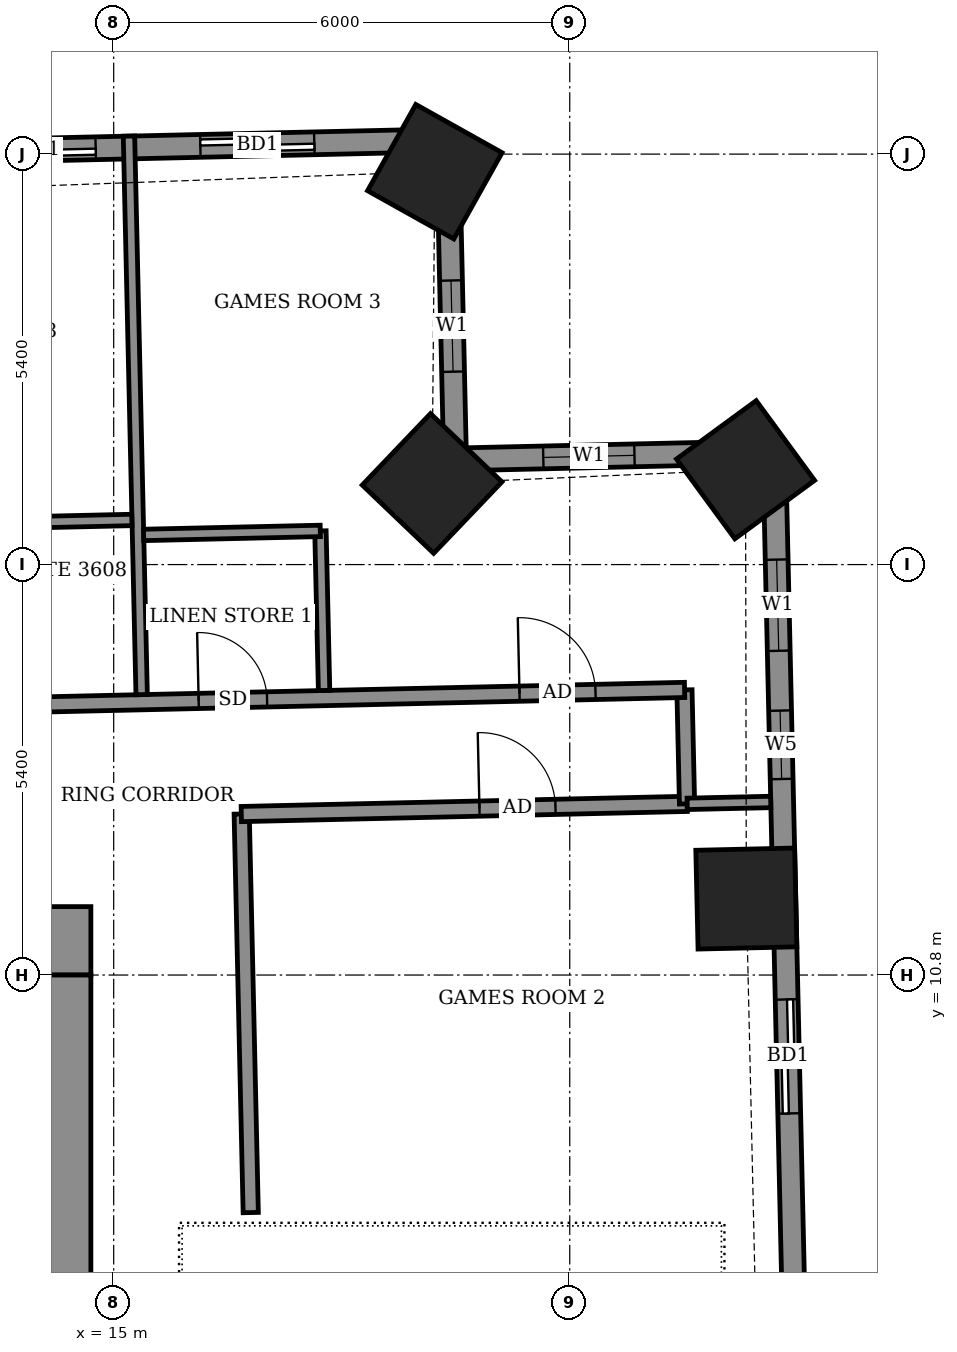
"""IFC4 building model, lengths in metres.
Left out: names, types, materials, properties, quantities, classifications, styles, units other than length and angle.
Written with IfcOpenShell. Run it as: python <this file> out.ifc"""

import sys

from ifc_helpers import new_model, si_unit, direction, frame, frame_2d, origin, origin_2d, place, context, subcontext, project, spatial, rectangle, extrude, element, fill, save


model = new_model("IFC4")
c1 = context("Model", 3, precision=1e-05, world=origin(), true_north=direction((0.0, 1.0)))
c2 = subcontext(c1, "Body", "Model", "MODEL_VIEW")
j1 = project(units=[si_unit("LENGTHUNIT", "METRE"), si_unit("PLANEANGLEUNIT", "RADIAN")], contexts=[c1])
p1 = place(None, origin())
s1 = spatial("IfcSite", under=j1, at=p1, CompositionType="ELEMENT")
p2 = place(p1, origin())
s2 = spatial("IfcBuilding", under=s1, at=p2, CompositionType="ELEMENT")
p3 = place(p2, frame((0.0, 0.0, 144.5)))
s3 = spatial("IfcBuildingStorey", under=s2, at=p3, CompositionType="ELEMENT", Elevation=144.5)
for number, where, z_axis, x_axis in (
    (1, (23.323, 11.806, -0.55), (0.0, 0.0, 1.0), (-0.023, 1.0, 0.0)),
    (2, (23.313, 17.448, -0.55), (0.0, 0.0, 1.0), (-0.591, 0.807, 0.0)),
    (3, (19.189, 17.267, -0.55), (0.0, 0.0, 1.0), (-0.723, 0.691, 0.0)),
    (4, (19.225, 21.369, -0.55), (0.0, 0.0, 1.0), (-0.873, 0.488, 0.0)),
):
    element("IfcColumn", number, at=place(p3, frame(where, z_axis=z_axis, x_axis=x_axis)), inside=s3, PredefinedType="COLUMN", context=c2, shape_type="SweptSolid", body=[
        extrude(rectangle(XDim=1.3, YDim=1.3, at=origin_2d()), origin(), (0.0, 0.0, 1.0), 3.6),
    ])
p4 = place(p3, frame((23.961, 5.752, 0.0), z_axis=(0.0, 0.0, 1.0), x_axis=(-0.022715362207, 0.999741972871, 0.0)))
e5 = element("IfcWall", 5, at=p4, inside=s3, PredefinedType="SOLIDWALL", context=c2, shape_type="SweptSolid", body=[
    extrude(rectangle(XDim=11.93, YDim=0.3, at=frame_2d((5.965, 0.0))), origin(), (0.0, 0.0, 1.0), 3.05),
])
p5 = place(p4, frame((3.228, 0.0, 0.0)))
e6 = element("IfcOpeningElement", 6, at=p5, cuts=e5, PredefinedType="OPENING", context=c2, shape_type="SweptSolid", body=[
    extrude(rectangle(XDim=1.5, YDim=2.4, at=frame_2d((0.75, 1.2))), frame((0.0, 0.16, 0.0), z_axis=(0.0, -1.0, 0.0), x_axis=(1.0, 0.0, 0.0)), (0.0, 0.0, 1.0), 0.32),
])
p6 = place(p4, frame((7.629, 0.0, 0.9)))
e7 = element("IfcOpeningElement", 7, at=p6, cuts=e5, PredefinedType="OPENING", context=c2, shape_type="SweptSolid", body=[
    extrude(rectangle(XDim=0.9, YDim=1.5, at=frame_2d((0.45, 0.75))), frame((0.0, 0.16, 0.0), z_axis=(0.0, -1.0, 0.0), x_axis=(1.0, 0.0, 0.0)), (0.0, 0.0, 1.0), 0.32),
])
p7 = place(p4, frame((9.316, 0.0, 0.9)))
e8 = element("IfcOpeningElement", 8, at=p7, cuts=e5, PredefinedType="OPENING", context=c2, shape_type="SweptSolid", body=[
    extrude(rectangle(XDim=1.2, YDim=1.5, at=frame_2d((0.6, 0.75))), frame((0.0, 0.16, 0.0), z_axis=(0.0, -1.0, 0.0), x_axis=(1.0, 0.0, 0.0)), (0.0, 0.0, 1.0), 0.32),
])
p8 = place(p3, frame((23.69, 17.679, 0.0), z_axis=(0.0, 0.0, 1.0), x_axis=(-0.999739037152, -0.022844202663, 0.0)))
e9 = element("IfcWall", 9, at=p8, inside=s3, PredefinedType="SOLIDWALL", context=c2, shape_type="SweptSolid", body=[
    extrude(rectangle(XDim=4.2, YDim=0.3, at=frame_2d((2.1, 0.0))), origin(), (0.0, 0.0, 1.0), 2.55),
])
p9 = place(p8, frame((1.839, 0.0, 0.9)))
e10 = element("IfcOpeningElement", 10, at=p9, cuts=e9, PredefinedType="OPENING", context=c2, shape_type="SweptSolid", body=[
    extrude(rectangle(XDim=1.2, YDim=1.5, at=frame_2d((0.6, 0.75))), frame((0.0, 0.16, 0.0), z_axis=(0.0, -1.0, 0.0), x_axis=(1.0, 0.0, 0.0)), (0.0, 0.0, 1.0), 0.32),
])
p10 = place(p3, frame((19.491, 17.583, 0.0), z_axis=(0.0, 0.0, 1.0), x_axis=(-0.022611811187, 0.999744320311, 0.0)))
e11 = element("IfcWall", 11, at=p10, inside=s3, PredefinedType="SOLIDWALL", context=c2, shape_type="SweptSolid", body=[
    extrude(rectangle(XDim=4.2, YDim=0.3, at=frame_2d((2.1, 0.0))), origin(), (0.0, 0.0, 1.0), 2.55),
])
p11 = place(p10, frame((1.155, 0.0, 0.9)))
e12 = element("IfcOpeningElement", 12, at=p11, cuts=e11, PredefinedType="OPENING", context=c2, shape_type="SweptSolid", body=[
    extrude(rectangle(XDim=1.2, YDim=1.5, at=frame_2d((0.6, 0.75))), frame((0.0, 0.16, 0.0), z_axis=(0.0, -1.0, 0.0), x_axis=(1.0, 0.0, 0.0)), (0.0, 0.0, 1.0), 0.32),
])
p12 = place(p3, frame((19.396, 21.782, 0.0), z_axis=(0.0, 0.0, 1.0), x_axis=(-0.999742636707, -0.022686126826, 0.0)))
e13 = element("IfcWall", 13, at=p12, inside=s3, PredefinedType="SOLIDWALL", context=c2, shape_type="SweptSolid", body=[
    extrude(rectangle(XDim=42.444, YDim=0.3, at=frame_2d((21.222, 0.0))), origin(), (0.0, 0.0, 1.0), 3.05),
])
p13 = place(p12, frame((1.757, 0.0, 0.0)))
e14 = element("IfcOpeningElement", 14, at=p13, cuts=e13, PredefinedType="OPENING", context=c2, shape_type="SweptSolid", body=[
    extrude(rectangle(XDim=1.5, YDim=2.4, at=frame_2d((0.75, 1.2))), frame((0.0, 0.16, 0.0), z_axis=(0.0, -1.0, 0.0), x_axis=(1.0, 0.0, 0.0)), (0.0, 0.0, 1.0), 0.32),
])
p14 = place(p12, frame((4.634, 0.0, 0.0)))
e15 = element("IfcOpeningElement", 15, at=p14, cuts=e13, PredefinedType="OPENING", context=c2, shape_type="SweptSolid", body=[
    extrude(rectangle(XDim=1.5, YDim=2.4, at=frame_2d((0.75, 1.2))), frame((0.0, 0.16, 0.0), z_axis=(0.0, -1.0, 0.0), x_axis=(1.0, 0.0, 0.0)), (0.0, 0.0, 1.0), 0.32),
])
p15 = place(p12, frame((9.769, 0.0, 0.0)))
e16 = element("IfcOpeningElement", 16, at=p15, cuts=e13, PredefinedType="OPENING", context=c2, shape_type="SweptSolid", body=[
    extrude(rectangle(XDim=1.5, YDim=2.4, at=frame_2d((0.75, 1.2))), frame((0.0, 0.16, 0.0), z_axis=(0.0, -1.0, 0.0), x_axis=(1.0, 0.0, 0.0)), (0.0, 0.0, 1.0), 0.32),
])
p16 = place(p12, frame((14.946, 0.0, 0.0)))
e17 = element("IfcOpeningElement", 17, at=p16, cuts=e13, PredefinedType="OPENING", context=c2, shape_type="SweptSolid", body=[
    extrude(rectangle(XDim=1.5, YDim=2.4, at=frame_2d((0.75, 1.2))), frame((0.0, 0.16, 0.0), z_axis=(0.0, -1.0, 0.0), x_axis=(1.0, 0.0, 0.0)), (0.0, 0.0, 1.0), 0.32),
])
p17 = place(p12, frame((18.108, 0.0, 0.0)))
e18 = element("IfcOpeningElement", 18, at=p17, cuts=e13, PredefinedType="OPENING", context=c2, shape_type="SweptSolid", body=[
    extrude(rectangle(XDim=1.5, YDim=2.4, at=frame_2d((0.75, 1.2))), frame((0.0, 0.16, 0.0), z_axis=(0.0, -1.0, 0.0), x_axis=(1.0, 0.0, 0.0)), (0.0, 0.0, 1.0), 0.32),
])
p18 = place(p12, frame((22.733, 0.0, 0.0)))
e19 = element("IfcOpeningElement", 19, at=p18, cuts=e13, PredefinedType="OPENING", context=c2, shape_type="SweptSolid", body=[
    extrude(rectangle(XDim=1.5, YDim=2.4, at=frame_2d((0.75, 1.2))), frame((0.0, 0.16, 0.0), z_axis=(0.0, -1.0, 0.0), x_axis=(1.0, 0.0, 0.0)), (0.0, 0.0, 1.0), 0.32),
])
p19 = place(p12, frame((25.895, 0.0, 0.0)))
e20 = element("IfcOpeningElement", 20, at=p19, cuts=e13, PredefinedType="OPENING", context=c2, shape_type="SweptSolid", body=[
    extrude(rectangle(XDim=1.5, YDim=2.4, at=frame_2d((0.75, 1.2))), frame((0.0, 0.16, 0.0), z_axis=(0.0, -1.0, 0.0), x_axis=(1.0, 0.0, 0.0)), (0.0, 0.0, 1.0), 0.32),
])
p20 = place(p12, frame((30.944, 0.0, 0.0)))
e21 = element("IfcOpeningElement", 21, at=p20, cuts=e13, PredefinedType="OPENING", context=c2, shape_type="SweptSolid", body=[
    extrude(rectangle(XDim=1.5, YDim=2.4, at=frame_2d((0.75, 1.2))), frame((0.0, 0.16, 0.0), z_axis=(0.0, -1.0, 0.0), x_axis=(1.0, 0.0, 0.0)), (0.0, 0.0, 1.0), 0.32),
])
p21 = place(p12, frame((36.232, 0.0, 0.0)))
e22 = element("IfcOpeningElement", 22, at=p21, cuts=e13, PredefinedType="OPENING", context=c2, shape_type="SweptSolid", body=[
    extrude(rectangle(XDim=1.5, YDim=2.4, at=frame_2d((0.75, 1.2))), frame((0.0, 0.16, 0.0), z_axis=(0.0, -1.0, 0.0), x_axis=(1.0, 0.0, 0.0)), (0.0, 0.0, 1.0), 0.32),
])
p22 = place(p12, frame((38.612, 0.0, 0.9)))
e23 = element("IfcOpeningElement", 23, at=p22, cuts=e13, PredefinedType="OPENING", context=c2, shape_type="SweptSolid", body=[
    extrude(rectangle(XDim=2.4, YDim=1.5, at=frame_2d((1.2, 0.75))), frame((0.0, 0.16, 0.0), z_axis=(0.0, -1.0, 0.0), x_axis=(1.0, 0.0, 0.0)), (0.0, 0.0, 1.0), 0.32),
])
p23 = place(p3, frame((16.803, 7.675, 0.0), z_axis=(0.0, 0.0, 1.0), x_axis=(-0.022667483124, 0.999743059595, 0.0)))
e24 = element("IfcWall", 24, at=p23, inside=s3, PredefinedType="PARTITIONING", context=c2, shape_type="SweptSolid", body=[
    extrude(rectangle(XDim=5.245, YDim=0.2, at=frame_2d((2.623, 0.0))), origin(), (0.0, 0.0, 1.0), 3.05),
])
p24 = place(p3, frame((16.679, 12.918, 0.0), z_axis=(0.0, 0.0, 1.0), x_axis=(0.999739057042, 0.022843332181, 0.0)))
e25 = element("IfcWall", 25, at=p24, inside=s3, PredefinedType="PARTITIONING", context=c2, shape_type="SweptSolid", body=[
    extrude(rectangle(XDim=5.867, YDim=0.2, at=frame_2d((2.934, 0.0))), origin(), (0.0, 0.0, 1.0), 3.05),
])
p25 = place(p24, frame((3.134, 0.0, 0.0)))
e26 = element("IfcOpeningElement", 26, at=p25, cuts=e25, PredefinedType="OPENING", context=c2, shape_type="SweptSolid", body=[
    extrude(rectangle(XDim=1.0, YDim=2.1, at=frame_2d((0.5, 1.05))), frame((0.0, 0.11, 0.0), z_axis=(0.0, -1.0, 0.0), x_axis=(1.0, 0.0, 0.0)), (0.0, 0.0, 1.0), 0.22),
])
p26 = place(p3, frame((22.543, 13.052, 0.0), z_axis=(0.0, 0.0, 1.0), x_axis=(-0.022632637625, 0.99974384905, 0.0)))
e27 = element("IfcWall", 27, at=p26, inside=s3, PredefinedType="PARTITIONING", context=c2, shape_type="SweptSolid", body=[
    extrude(rectangle(XDim=1.5, YDim=0.2, at=frame_2d((0.75, 0.0))), origin(), (0.0, 0.0, 1.0), 3.05),
])
p27 = place(p3, frame((22.545, 13.052, 0.0), z_axis=(0.0, 0.0, 1.0), x_axis=(0.999743438074, 0.022650784248, 0.0)))
e28 = element("IfcWall", 28, at=p27, inside=s3, PredefinedType="PARTITIONING", context=c2, shape_type="SweptSolid", body=[
    extrude(rectangle(XDim=1.099, YDim=0.15, at=frame_2d((0.55, 0.0))), origin(), (0.0, 0.0, 1.0), 2.55),
])
p28 = place(p3, frame((-26.421, 13.441, 0.0), z_axis=(0.0, 0.0, 1.0), x_axis=(0.999742754064, 0.022680954485, 0.0)))
e29 = element("IfcWall", 29, at=p28, inside=s3, PredefinedType="PARTITIONING", context=c2, shape_type="SweptSolid", body=[
    extrude(rectangle(XDim=48.945, YDim=0.2, at=frame_2d((24.472, 0.0))), origin(), (0.0, 0.0, 1.0), 3.05),
])
p29 = place(p28, frame((46.772, 0.0, 0.0)))
e30 = element("IfcOpeningElement", 30, at=p29, cuts=e29, PredefinedType="OPENING", context=c2, shape_type="SweptSolid", body=[
    extrude(rectangle(XDim=1.0, YDim=2.1, at=frame_2d((0.5, 1.05))), frame((0.0, 0.11, 0.0), z_axis=(0.0, -1.0, 0.0), x_axis=(1.0, 0.0, 0.0)), (0.0, 0.0, 1.0), 0.22),
])
p30 = place(p28, frame((42.55, 0.0, 0.0)))
e31 = element("IfcOpeningElement", 31, at=p30, cuts=e29, PredefinedType="OPENING", context=c2, shape_type="SweptSolid", body=[
    extrude(rectangle(XDim=0.9, YDim=2.1, at=frame_2d((0.45, 1.05))), frame((0.0, 0.11, 0.0), z_axis=(0.0, -1.0, 0.0), x_axis=(1.0, 0.0, 0.0)), (0.0, 0.0, 1.0), 0.22),
])
p31 = place(p28, frame((38.05, 0.0, 0.0)))
e32 = element("IfcOpeningElement", 32, at=p31, cuts=e29, PredefinedType="OPENING", context=c2, shape_type="SweptSolid", body=[
    extrude(rectangle(XDim=0.9, YDim=2.1, at=frame_2d((0.45, 1.05))), frame((0.0, 0.11, 0.0), z_axis=(0.0, -1.0, 0.0), x_axis=(1.0, 0.0, 0.0)), (0.0, 0.0, 1.0), 0.22),
])
p32 = place(p28, frame((36.225, 0.0, 0.0)))
e33 = element("IfcOpeningElement", 33, at=p32, cuts=e29, PredefinedType="OPENING", context=c2, shape_type="SweptSolid", body=[
    extrude(rectangle(XDim=0.9, YDim=2.1, at=frame_2d((0.45, 1.05))), frame((0.0, 0.11, 0.0), z_axis=(0.0, -1.0, 0.0), x_axis=(1.0, 0.0, 0.0)), (0.0, 0.0, 1.0), 0.22),
])
p33 = place(p28, frame((29.575, 0.0, 0.0)))
e34 = element("IfcOpeningElement", 34, at=p33, cuts=e29, PredefinedType="OPENING", context=c2, shape_type="SweptSolid", body=[
    extrude(rectangle(XDim=0.9, YDim=2.1, at=frame_2d((0.45, 1.05))), frame((0.0, 0.11, 0.0), z_axis=(0.0, -1.0, 0.0), x_axis=(1.0, 0.0, 0.0)), (0.0, 0.0, 1.0), 0.22),
])
p34 = place(p28, frame((27.75, 0.0, 0.0)))
e35 = element("IfcOpeningElement", 35, at=p34, cuts=e29, PredefinedType="OPENING", context=c2, shape_type="SweptSolid", body=[
    extrude(rectangle(XDim=0.9, YDim=2.1, at=frame_2d((0.45, 1.05))), frame((0.0, 0.11, 0.0), z_axis=(0.0, -1.0, 0.0), x_axis=(1.0, 0.0, 0.0)), (0.0, 0.0, 1.0), 0.22),
])
p35 = place(p28, frame((21.125, 0.0, 0.0)))
e36 = element("IfcOpeningElement", 36, at=p35, cuts=e29, PredefinedType="OPENING", context=c2, shape_type="SweptSolid", body=[
    extrude(rectangle(XDim=0.9, YDim=2.1, at=frame_2d((0.45, 1.05))), frame((0.0, 0.11, 0.0), z_axis=(0.0, -1.0, 0.0), x_axis=(1.0, 0.0, 0.0)), (0.0, 0.0, 1.0), 0.22),
])
p36 = place(p28, frame((19.275, 0.0, 0.0)))
e37 = element("IfcOpeningElement", 37, at=p36, cuts=e29, PredefinedType="OPENING", context=c2, shape_type="SweptSolid", body=[
    extrude(rectangle(XDim=0.9, YDim=2.1, at=frame_2d((0.45, 1.05))), frame((0.0, 0.11, 0.0), z_axis=(0.0, -1.0, 0.0), x_axis=(1.0, 0.0, 0.0)), (0.0, 0.0, 1.0), 0.22),
])
p37 = place(p28, frame((12.65, 0.0, 0.0)))
e38 = element("IfcOpeningElement", 38, at=p37, cuts=e29, PredefinedType="OPENING", context=c2, shape_type="SweptSolid", body=[
    extrude(rectangle(XDim=0.9, YDim=2.1, at=frame_2d((0.45, 1.05))), frame((0.0, 0.11, 0.0), z_axis=(0.0, -1.0, 0.0), x_axis=(1.0, 0.0, 0.0)), (0.0, 0.0, 1.0), 0.22),
])
p38 = place(p28, frame((10.8, 0.0, 0.0)))
e39 = element("IfcOpeningElement", 39, at=p38, cuts=e29, PredefinedType="OPENING", context=c2, shape_type="SweptSolid", body=[
    extrude(rectangle(XDim=0.9, YDim=2.1, at=frame_2d((0.45, 1.05))), frame((0.0, 0.11, 0.0), z_axis=(0.0, -1.0, 0.0), x_axis=(1.0, 0.0, 0.0)), (0.0, 0.0, 1.0), 0.22),
])
p39 = place(p28, frame((1.55, 0.0, 0.0)))
e40 = element("IfcOpeningElement", 40, at=p39, cuts=e29, PredefinedType="OPENING", context=c2, shape_type="SweptSolid", body=[
    extrude(rectangle(XDim=1.0, YDim=2.1, at=frame_2d((0.5, 1.05))), frame((0.0, 0.11, 0.0), z_axis=(0.0, -1.0, 0.0), x_axis=(1.0, 0.0, 0.0)), (0.0, 0.0, 1.0), 0.22),
])
p40 = place(p28, frame((6.25, 0.0, 0.0)))
e41 = element("IfcOpeningElement", 41, at=p40, cuts=e29, PredefinedType="OPENING", context=c2, shape_type="SweptSolid", body=[
    extrude(rectangle(XDim=0.9, YDim=2.1, at=frame_2d((0.45, 1.05))), frame((0.0, 0.11, 0.0), z_axis=(0.0, -1.0, 0.0), x_axis=(1.0, 0.0, 0.0)), (0.0, 0.0, 1.0), 0.22),
])
p41 = place(p3, frame((15.368, 14.489, 0.0), z_axis=(0.0, 0.0, 1.0), x_axis=(-0.022720650804, 0.999741852694, 0.0)))
e42 = element("IfcWall", 42, at=p41, inside=s3, PredefinedType="PARTITIONING", context=c2, shape_type="SweptSolid", body=[
    extrude(rectangle(XDim=7.35, YDim=0.15, at=frame_2d((3.675, 0.0))), origin(), (0.0, 0.0, 1.0), 2.55),
])
p42 = place(p3, frame((17.768, 14.544, 0.0), z_axis=(0.0, 0.0, 1.0), x_axis=(-0.022906293375, 0.999737616439, 0.0)))
e43 = element("IfcWall", 43, at=p42, inside=s3, PredefinedType="PARTITIONING", context=c2, shape_type="SweptSolid", body=[
    extrude(rectangle(XDim=2.1, YDim=0.15, at=frame_2d((1.05, 0.0))), origin(), (0.0, 0.0, 1.0), 3.05),
])
for number, where, z_axis, x_axis in (
    (44, (15.394, 16.59, 0.0), (0.0, 0.0, 1.0), (1.0, 0.023, 0.0)),
    (45, (12.915, 16.734, 0.0), (0.0, 0.0, 1.0), (1.0, 0.023, 0.0)),
):
    element("IfcWall", number, at=place(p3, frame(where, z_axis=z_axis, x_axis=x_axis)), inside=s3, PredefinedType="PARTITIONING", context=c2, shape_type="SweptSolid", body=[
        extrude(rectangle(XDim=2.324, YDim=0.15, at=frame_2d((1.162, 0.0))), origin(), (0.0, 0.0, 1.0), 3.05),
    ])
p43 = place(p3, frame((-14.7, 11.25, 0.0), z_axis=(0.0, 0.0, 1.0), x_axis=(1.0, 0.0, 0.0)))
e46 = element("IfcWall", 46, at=p43, inside=s3, PredefinedType="SHEAR", context=c2, shape_type="SweptSolid", body=[
    extrude(rectangle(XDim=29.4, YDim=0.9, at=frame_2d((14.7, 0.0))), origin(), (0.0, 0.0, 1.0), 3.6),
])
p44 = place(p3, frame((14.25, -10.8, 0.0), z_axis=(0.0, 0.0, 1.0), x_axis=(0.0, 1.0, 0.0)))
e47 = element("IfcWall", 47, at=p44, inside=s3, PredefinedType="SHEAR", context=c2, shape_type="SweptSolid", body=[
    extrude(rectangle(XDim=21.6, YDim=0.9, at=frame_2d((10.8, 0.0))), origin(), (0.0, 0.0, 1.0), 3.6),
])
p45 = place(p44, frame((1.2, 0.0, 0.0)))
e48 = element("IfcOpeningElement", 48, at=p45, cuts=e47, PredefinedType="OPENING", context=c2, shape_type="SweptSolid", body=[
    extrude(rectangle(XDim=1.2, YDim=2.1, at=frame_2d((0.6, 1.05))), frame((0.0, 0.46, 0.0), z_axis=(0.0, -1.0, 0.0), x_axis=(1.0, 0.0, 0.0)), (0.0, 0.0, 1.0), 0.92),
])
p46 = place(p5, origin())
e49 = element("IfcDoor", 49, at=p46, inside=s3, OperationType="SLIDING_TO_LEFT", PredefinedType="DOOR", context=c2, shape_type="SweptSolid", body=[
    extrude(rectangle(XDim=1.5, YDim=2.4, at=frame_2d((0.75, 1.2))), frame((0.0, 0.025, 0.0), z_axis=(0.0, -1.0, 0.0), x_axis=(1.0, 0.0, 0.0)), (0.0, 0.0, 1.0), 0.05),
])
fill(e6, e49)
p47 = place(p6, origin())
e50 = element("IfcWindow", 50, at=p47, inside=s3, PartitioningType="SINGLE_PANEL", PredefinedType="WINDOW", context=c2, shape_type="SweptSolid", body=[
    extrude(rectangle(XDim=0.9, YDim=1.5, at=frame_2d((0.45, 0.75))), frame((0.0, 0.03, 0.0), z_axis=(0.0, -1.0, 0.0), x_axis=(1.0, 0.0, 0.0)), (0.0, 0.0, 1.0), 0.06),
])
fill(e7, e50)
p48 = place(p7, origin())
e51 = element("IfcWindow", 51, at=p48, inside=s3, PartitioningType="SINGLE_PANEL", PredefinedType="WINDOW", context=c2, shape_type="SweptSolid", body=[
    extrude(rectangle(XDim=1.2, YDim=1.5, at=frame_2d((0.6, 0.75))), frame((0.0, 0.03, 0.0), z_axis=(0.0, -1.0, 0.0), x_axis=(1.0, 0.0, 0.0)), (0.0, 0.0, 1.0), 0.06),
])
fill(e8, e51)
p49 = place(p9, origin())
e52 = element("IfcWindow", 52, at=p49, inside=s3, PartitioningType="SINGLE_PANEL", PredefinedType="WINDOW", context=c2, shape_type="SweptSolid", body=[
    extrude(rectangle(XDim=1.2, YDim=1.5, at=frame_2d((0.6, 0.75))), frame((0.0, 0.03, 0.0), z_axis=(0.0, -1.0, 0.0), x_axis=(1.0, 0.0, 0.0)), (0.0, 0.0, 1.0), 0.06),
])
fill(e10, e52)
p50 = place(p11, origin())
e53 = element("IfcWindow", 53, at=p50, inside=s3, PartitioningType="SINGLE_PANEL", PredefinedType="WINDOW", context=c2, shape_type="SweptSolid", body=[
    extrude(rectangle(XDim=1.2, YDim=1.5, at=frame_2d((0.6, 0.75))), frame((0.0, 0.03, 0.0), z_axis=(0.0, -1.0, 0.0), x_axis=(1.0, 0.0, 0.0)), (0.0, 0.0, 1.0), 0.06),
])
fill(e12, e53)
p51 = place(p13, origin())
e54 = element("IfcDoor", 54, at=p51, inside=s3, OperationType="SLIDING_TO_LEFT", PredefinedType="DOOR", context=c2, shape_type="SweptSolid", body=[
    extrude(rectangle(XDim=1.5, YDim=2.4, at=frame_2d((0.75, 1.2))), frame((0.0, 0.025, 0.0), z_axis=(0.0, -1.0, 0.0), x_axis=(1.0, 0.0, 0.0)), (0.0, 0.0, 1.0), 0.05),
])
fill(e14, e54)
p52 = place(p14, origin())
e55 = element("IfcDoor", 55, at=p52, inside=s3, OperationType="SLIDING_TO_LEFT", PredefinedType="DOOR", context=c2, shape_type="SweptSolid", body=[
    extrude(rectangle(XDim=1.5, YDim=2.4, at=frame_2d((0.75, 1.2))), frame((0.0, 0.025, 0.0), z_axis=(0.0, -1.0, 0.0), x_axis=(1.0, 0.0, 0.0)), (0.0, 0.0, 1.0), 0.05),
])
fill(e15, e55)
p53 = place(p25, origin())
e56 = element("IfcDoor", 56, at=p53, inside=s3, OperationType="SINGLE_SWING_LEFT", PredefinedType="DOOR", context=c2, shape_type="SweptSolid", body=[
    extrude(rectangle(XDim=1.0, YDim=2.1, at=frame_2d((0.5, 1.05))), frame((0.0, 0.025, 0.0), z_axis=(0.0, -1.0, 0.0), x_axis=(1.0, 0.0, 0.0)), (0.0, 0.0, 1.0), 0.05),
])
fill(e26, e56)
p54 = place(p29, origin())
e57 = element("IfcDoor", 57, at=p54, inside=s3, OperationType="SINGLE_SWING_RIGHT", PredefinedType="DOOR", context=c2, shape_type="SweptSolid", body=[
    extrude(rectangle(XDim=1.0, YDim=2.1, at=frame_2d((0.5, 1.05))), frame((0.0, 0.025, 0.0), z_axis=(0.0, -1.0, 0.0), x_axis=(1.0, 0.0, 0.0)), (0.0, 0.0, 1.0), 0.05),
])
fill(e30, e57)
p55 = place(p30, origin())
e58 = element("IfcDoor", 58, at=p55, inside=s3, OperationType="SINGLE_SWING_LEFT", PredefinedType="DOOR", context=c2, shape_type="SweptSolid", body=[
    extrude(rectangle(XDim=0.9, YDim=2.1, at=frame_2d((0.45, 1.05))), frame((0.0, 0.025, 0.0), z_axis=(0.0, -1.0, 0.0), x_axis=(1.0, 0.0, 0.0)), (0.0, 0.0, 1.0), 0.05),
])
fill(e31, e58)
save(model, sys.argv[1])
